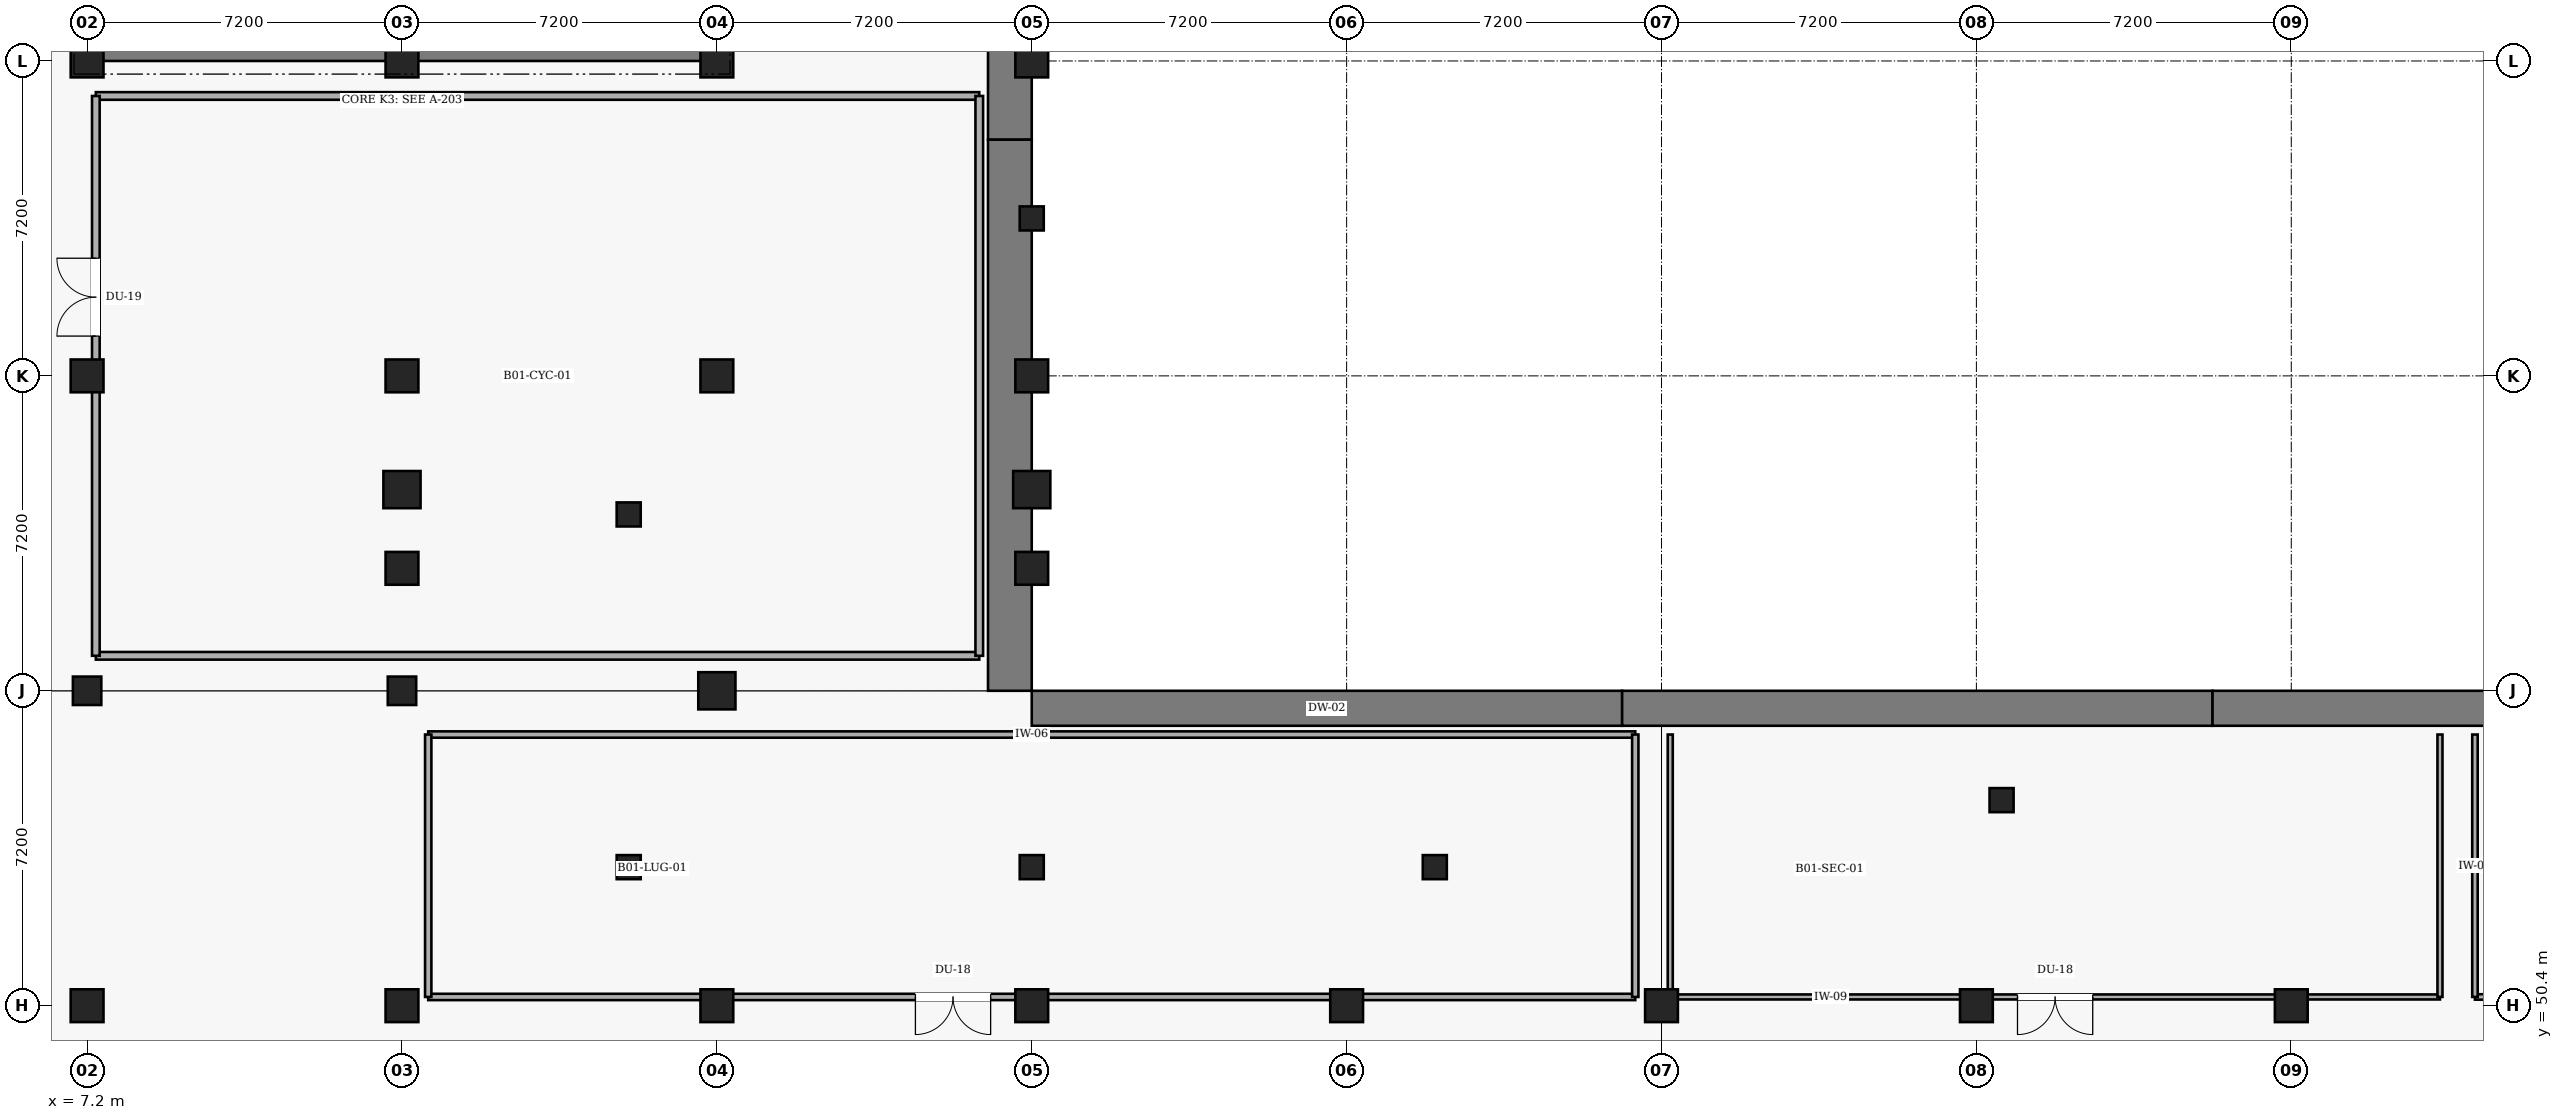
"""IFC4 building model, lengths in metres.
Left out: names, types, materials, properties, quantities, classifications, styles, units other than length and angle.
Written with IfcOpenShell. Run it as: python <this file> out.ifc"""

import sys

from ifc_helpers import new_model, si_unit, direction, frame, frame_2d, origin, origin_2d, place, context, subcontext, project, spatial, rectangle, extrude, element, fill, save


model = new_model("IFC4")
c1 = context("Model", 3, precision=1e-05, world=origin(), true_north=direction((0.0, 1.0)))
c2 = subcontext(c1, "Body", "Model", "MODEL_VIEW")
j1 = project(units=[si_unit("LENGTHUNIT", "METRE"), si_unit("PLANEANGLEUNIT", "RADIAN")], contexts=[c1])
p1 = place(None, origin())
s1 = spatial("IfcSite", under=j1, at=p1, CompositionType="ELEMENT")
p2 = place(p1, origin())
s2 = spatial("IfcBuilding", under=s1, at=p2, CompositionType="ELEMENT")
p3 = place(p2, frame((0.0, 0.0, -5.4)))
s3 = spatial("IfcBuildingStorey", under=s2, at=p3, CompositionType="ELEMENT", Elevation=-5.4)
p4 = place(p3, frame((28.3, 82.8, 0.0), z_axis=(0.0, 0.0, 1.0), x_axis=(0.0, -1.0, 0.0)))
e1 = element("IfcWall", 1, at=p4, inside=s3, PredefinedType="USERDEFINED", context=c2, shape_type="SweptSolid", body=[
    extrude(rectangle(XDim=12.6, YDim=1.0, at=frame_2d((6.3, 0.0))), origin(), (0.0, 0.0, 1.0), 4.95),
])
p5 = place(p3, frame((28.3, 70.2, 0.0), z_axis=(0.0, 0.0, 1.0), x_axis=(0.0, -1.0, 0.0)))
e2 = element("IfcWall", 2, at=p5, inside=s3, PredefinedType="USERDEFINED", context=c2, shape_type="SweptSolid", body=[
    extrude(rectangle(XDim=12.6, YDim=1.0, at=frame_2d((6.3, 0.0))), origin(), (0.0, 0.0, 1.0), 4.95),
])
for number, where, z_axis, x_axis in (
    (3, (28.8, 57.2, 0.0), (0.0, 0.0, 1.0), (1.0, 0.0, 0.0)),
    (4, (42.3, 57.2, 0.0), (0.0, 0.0, 1.0), (1.0, 0.0, 0.0)),
    (5, (55.8, 57.2, 0.0), (0.0, 0.0, 1.0), (1.0, 0.0, 0.0)),
):
    element("IfcWall", number, at=place(p3, frame(where, z_axis=z_axis, x_axis=x_axis)), inside=s3, PredefinedType="USERDEFINED", context=c2, shape_type="SweptSolid", body=[
        extrude(rectangle(XDim=13.5, YDim=0.8, at=frame_2d((6.75, 0.0))), origin(), (0.0, 0.0, 1.0), 4.95),
    ])
p6 = place(p3, frame((21.6, 72.175, 0.0), z_axis=(0.0, 0.0, 1.0), x_axis=(-1.0, 0.0, 0.0)))
e6 = element("IfcWall", 6, at=p6, inside=s3, PredefinedType="SHEAR", context=c2, shape_type="SweptSolid", body=[
    extrude(rectangle(XDim=14.4, YDim=0.35, at=frame_2d((7.2, 0.0))), origin(), (0.0, 0.0, 1.0), 5.4),
])
p7 = place(p3, frame((7.2, 50.4, 0.0), z_axis=(0.0, 0.0, 1.0), x_axis=(1.0, 0.0, 0.0)))
e7 = element("IfcColumn", 7, at=p7, inside=s3, PredefinedType="COLUMN", context=c2, shape_type="SweptSolid", body=[
    extrude(rectangle(XDim=0.75, YDim=0.75, at=origin_2d()), origin(), (0.0, 0.0, 1.0), 4.95),
])
p8 = place(p3, frame((7.2, 57.6, 0.0), z_axis=(0.0, 0.0, 1.0), x_axis=(1.0, 0.0, 0.0)))
e8 = element("IfcColumn", 8, at=p8, inside=s3, PredefinedType="COLUMN", context=c2, shape_type="SweptSolid", body=[
    extrude(rectangle(XDim=0.65, YDim=0.65, at=origin_2d()), origin(), (0.0, 0.0, 1.0), 5.0),
])
for number, where, z_axis, x_axis in (
    (9, (7.2, 64.8, 0.0), (0.0, 0.0, 1.0), (1.0, 0.0, 0.0)),
    (10, (7.2, 72.0, 0.0), (0.0, 0.0, 1.0), (1.0, 0.0, 0.0)),
):
    element("IfcColumn", number, at=place(p3, frame(where, z_axis=z_axis, x_axis=x_axis)), inside=s3, PredefinedType="COLUMN", context=c2, shape_type="SweptSolid", body=[
        extrude(rectangle(XDim=0.75, YDim=0.75, at=origin_2d()), origin(), (0.0, 0.0, 1.0), 5.0),
    ])
p9 = place(p3, frame((14.4, 50.4, 0.0), z_axis=(0.0, 0.0, 1.0), x_axis=(1.0, 0.0, 0.0)))
e11 = element("IfcColumn", 11, at=p9, inside=s3, PredefinedType="COLUMN", context=c2, shape_type="SweptSolid", body=[
    extrude(rectangle(XDim=0.75, YDim=0.75, at=origin_2d()), origin(), (0.0, 0.0, 1.0), 4.95),
])
p10 = place(p3, frame((14.4, 57.6, 0.0), z_axis=(0.0, 0.0, 1.0), x_axis=(1.0, 0.0, 0.0)))
e12 = element("IfcColumn", 12, at=p10, inside=s3, PredefinedType="COLUMN", context=c2, shape_type="SweptSolid", body=[
    extrude(rectangle(XDim=0.65, YDim=0.65, at=origin_2d()), origin(), (0.0, 0.0, 1.0), 5.0),
])
p11 = place(p3, frame((14.4, 60.4, 0.0), z_axis=(0.0, 0.0, 1.0), x_axis=(1.0, 0.0, 0.0)))
e13 = element("IfcColumn", 13, at=p11, inside=s3, PredefinedType="COLUMN", context=c2, shape_type="SweptSolid", body=[
    extrude(rectangle(XDim=0.75, YDim=0.75, at=origin_2d()), origin(), (0.0, 0.0, 1.0), 5.0),
])
p12 = place(p3, frame((14.4, 62.2, 0.0), z_axis=(0.0, 0.0, 1.0), x_axis=(1.0, 0.0, 0.0)))
e14 = element("IfcColumn", 14, at=p12, inside=s3, PredefinedType="COLUMN", context=c2, shape_type="SweptSolid", body=[
    extrude(rectangle(XDim=0.85, YDim=0.85, at=origin_2d()), origin(), (0.0, 0.0, 1.0), 5.0),
])
for number, where, z_axis, x_axis in (
    (15, (14.4, 64.8, 0.0), (0.0, 0.0, 1.0), (1.0, 0.0, 0.0)),
    (16, (14.4, 72.0, 0.0), (0.0, 0.0, 1.0), (1.0, 0.0, 0.0)),
):
    element("IfcColumn", number, at=place(p3, frame(where, z_axis=z_axis, x_axis=x_axis)), inside=s3, PredefinedType="COLUMN", context=c2, shape_type="SweptSolid", body=[
        extrude(rectangle(XDim=0.75, YDim=0.75, at=origin_2d()), origin(), (0.0, 0.0, 1.0), 5.0),
    ])
p13 = place(p3, frame((21.6, 50.4, 0.0), z_axis=(0.0, 0.0, 1.0), x_axis=(1.0, 0.0, 0.0)))
e17 = element("IfcColumn", 17, at=p13, inside=s3, PredefinedType="COLUMN", context=c2, shape_type="SweptSolid", body=[
    extrude(rectangle(XDim=0.75, YDim=0.75, at=origin_2d()), origin(), (0.0, 0.0, 1.0), 4.95),
])
p14 = place(p3, frame((21.6, 57.6, 0.0), z_axis=(0.0, 0.0, 1.0), x_axis=(1.0, 0.0, 0.0)))
e18 = element("IfcColumn", 18, at=p14, inside=s3, PredefinedType="COLUMN", context=c2, shape_type="SweptSolid", body=[
    extrude(rectangle(XDim=0.85, YDim=0.85, at=origin_2d()), origin(), (0.0, 0.0, 1.0), 5.0),
])
for number, where, z_axis, x_axis in (
    (19, (21.6, 64.8, 0.0), (0.0, 0.0, 1.0), (1.0, 0.0, 0.0)),
    (20, (21.6, 72.0, 0.0), (0.0, 0.0, 1.0), (1.0, 0.0, 0.0)),
):
    element("IfcColumn", number, at=place(p3, frame(where, z_axis=z_axis, x_axis=x_axis)), inside=s3, PredefinedType="COLUMN", context=c2, shape_type="SweptSolid", body=[
        extrude(rectangle(XDim=0.75, YDim=0.75, at=origin_2d()), origin(), (0.0, 0.0, 1.0), 5.0),
    ])
p15 = place(p3, frame((28.8, 50.4, 0.0), z_axis=(0.0, 0.0, 1.0), x_axis=(1.0, 0.0, 0.0)))
e21 = element("IfcColumn", 21, at=p15, inside=s3, PredefinedType="COLUMN", context=c2, shape_type="SweptSolid", body=[
    extrude(rectangle(XDim=0.75, YDim=0.75, at=origin_2d()), origin(), (0.0, 0.0, 1.0), 4.95),
])
p16 = place(p3, frame((28.8, 60.4, 0.0), z_axis=(0.0, 0.0, 1.0), x_axis=(1.0, 0.0, 0.0)))
e22 = element("IfcColumn", 22, at=p16, inside=s3, PredefinedType="COLUMN", context=c2, shape_type="SweptSolid", body=[
    extrude(rectangle(XDim=0.75, YDim=0.75, at=origin_2d()), origin(), (0.0, 0.0, 1.0), 5.0),
])
p17 = place(p3, frame((28.8, 62.2, 0.0), z_axis=(0.0, 0.0, 1.0), x_axis=(1.0, 0.0, 0.0)))
e23 = element("IfcColumn", 23, at=p17, inside=s3, PredefinedType="COLUMN", context=c2, shape_type="SweptSolid", body=[
    extrude(rectangle(XDim=0.85, YDim=0.85, at=origin_2d()), origin(), (0.0, 0.0, 1.0), 5.0),
])
for number, where, z_axis, x_axis in (
    (24, (28.8, 64.8, 0.0), (0.0, 0.0, 1.0), (1.0, 0.0, 0.0)),
    (25, (28.8, 72.0, 0.0), (0.0, 0.0, 1.0), (1.0, 0.0, 0.0)),
):
    element("IfcColumn", number, at=place(p3, frame(where, z_axis=z_axis, x_axis=x_axis)), inside=s3, PredefinedType="COLUMN", context=c2, shape_type="SweptSolid", body=[
        extrude(rectangle(XDim=0.75, YDim=0.75, at=origin_2d()), origin(), (0.0, 0.0, 1.0), 5.0),
    ])
for number, where, z_axis, x_axis in (
    (26, (36.0, 50.4, 0.0), (0.0, 0.0, 1.0), (1.0, 0.0, 0.0)),
    (27, (43.2, 50.4, 0.0), (0.0, 0.0, 1.0), (1.0, 0.0, 0.0)),
    (28, (50.4, 50.4, 0.0), (0.0, 0.0, 1.0), (1.0, 0.0, 0.0)),
    (29, (57.6, 50.4, 0.0), (0.0, 0.0, 1.0), (1.0, 0.0, 0.0)),
):
    element("IfcColumn", number, at=place(p3, frame(where, z_axis=z_axis, x_axis=x_axis)), inside=s3, PredefinedType="COLUMN", context=c2, shape_type="SweptSolid", body=[
        extrude(rectangle(XDim=0.75, YDim=0.75, at=origin_2d()), origin(), (0.0, 0.0, 1.0), 4.95),
    ])
for number, where, z_axis, x_axis in (
    (30, (19.584, 53.568, 0.0), (0.0, 0.0, 1.0), (1.0, 0.0, 0.0)),
    (31, (19.584, 61.632, 0.0), (0.0, 0.0, 1.0), (1.0, 0.0, 0.0)),
    (32, (28.8, 53.568, 0.0), (0.0, 0.0, 1.0), (1.0, 0.0, 0.0)),
    (33, (38.016, 53.568, 0.0), (0.0, 0.0, 1.0), (1.0, 0.0, 0.0)),
    (34, (50.976, 55.1, 0.0), (0.0, 0.0, 1.0), (1.0, 0.0, 0.0)),
):
    element("IfcColumn", number, at=place(p3, frame(where, z_axis=z_axis, x_axis=x_axis)), inside=s3, PredefinedType="COLUMN", context=c2, shape_type="SweptSolid", body=[
        extrude(rectangle(XDim=0.55, YDim=0.55, at=origin_2d()), origin(), (0.0, 0.0, 1.0), 4.95),
    ])
p18 = place(p3, frame((28.8, 68.4, 0.0), z_axis=(0.0, 0.0, 1.0), x_axis=(1.0, 0.0, 0.0)))
e35 = element("IfcColumn", 35, at=p18, inside=s3, PredefinedType="COLUMN", context=c2, shape_type="SweptSolid", body=[
    extrude(rectangle(XDim=0.55, YDim=0.55, at=origin_2d()), origin(), (0.0, 0.0, 1.0), 4.85),
])
p19 = place(p3, frame((15.0, 56.6, 0.0), z_axis=(0.0, 0.0, 1.0), x_axis=(1.0, 0.0, 0.0)))
e36 = element("IfcWall", 36, at=p19, inside=s3, PredefinedType="PARTITIONING", context=c2, shape_type="SweptSolid", body=[
    extrude(rectangle(XDim=27.6, YDim=0.145, at=frame_2d((13.8, 0.0))), origin(), (0.0, 0.0, 1.0), 5.05),
])
p20 = place(p3, frame((42.6, 50.6, 0.0), z_axis=(0.0, 0.0, 1.0), x_axis=(-1.0, 0.0, 0.0)))
e37 = element("IfcWall", 37, at=p20, inside=s3, PredefinedType="PARTITIONING", context=c2, shape_type="SweptSolid", body=[
    extrude(rectangle(XDim=27.6, YDim=0.145, at=frame_2d((13.8, 0.0))), origin(), (0.0, 0.0, 1.0), 4.15),
])
p21 = place(p20, frame((14.74, 0.0, 0.0)))
e38 = element("IfcOpeningElement", 38, at=p21, cuts=e37, PredefinedType="OPENING", context=c2, shape_type="SweptSolid", body=[
    extrude(rectangle(XDim=1.72, YDim=2.22, at=frame_2d((0.86, 1.11))), frame((0.0, 0.083, 0.0), z_axis=(0.0, -1.0, 0.0), x_axis=(1.0, 0.0, 0.0)), (0.0, 0.0, 1.0), 0.165),
])
for number, where, z_axis, x_axis in (
    (39, (42.6, 56.6, 0.0), (0.0, 0.0, 1.0), (0.0, -1.0, 0.0)),
    (40, (15.0, 50.6, 0.0), (0.0, 0.0, 1.0), (0.0, 1.0, 0.0)),
):
    element("IfcWall", number, at=place(p3, frame(where, z_axis=z_axis, x_axis=x_axis)), inside=s3, PredefinedType="PARTITIONING", context=c2, shape_type="SweptSolid", body=[
        extrude(rectangle(XDim=6.0, YDim=0.145, at=frame_2d((3.0, 0.0))), origin(), (0.0, 0.0, 1.0), 5.05),
    ])
p22 = place(p3, frame((61.0, 50.6, 0.0), z_axis=(0.0, 0.0, 1.0), x_axis=(-1.0, 0.0, 0.0)))
e41 = element("IfcWall", 41, at=p22, inside=s3, PredefinedType="PARTITIONING", context=c2, shape_type="SweptSolid", body=[
    extrude(rectangle(XDim=17.6, YDim=0.115, at=frame_2d((8.8, 0.0))), origin(), (0.0, 0.0, 1.0), 4.15),
])
p23 = place(p22, frame((7.94, 0.0, 0.0)))
e42 = element("IfcOpeningElement", 42, at=p23, cuts=e41, PredefinedType="OPENING", context=c2, shape_type="SweptSolid", body=[
    extrude(rectangle(XDim=1.72, YDim=2.22, at=frame_2d((0.86, 1.11))), frame((0.0, 0.067, 0.0), z_axis=(0.0, -1.0, 0.0), x_axis=(1.0, 0.0, 0.0)), (0.0, 0.0, 1.0), 0.135),
])
for number, where, z_axis, x_axis in (
    (43, (61.0, 56.6, 0.0), (0.0, 0.0, 1.0), (0.0, -1.0, 0.0)),
    (44, (43.4, 50.6, 0.0), (0.0, 0.0, 1.0), (0.0, 1.0, 0.0)),
):
    element("IfcWall", number, at=place(p3, frame(where, z_axis=z_axis, x_axis=x_axis)), inside=s3, PredefinedType="PARTITIONING", context=c2, shape_type="SweptSolid", body=[
        extrude(rectangle(XDim=6.0, YDim=0.115, at=frame_2d((3.0, 0.0))), origin(), (0.0, 0.0, 1.0), 5.05),
    ])
p24 = place(p3, frame((70.6, 50.6, 0.0), z_axis=(0.0, 0.0, 1.0), x_axis=(-1.0, 0.0, 0.0)))
e45 = element("IfcWall", 45, at=p24, inside=s3, PredefinedType="PARTITIONING", context=c2, shape_type="SweptSolid", body=[
    extrude(rectangle(XDim=8.8, YDim=0.125, at=frame_2d((4.4, 0.0))), origin(), (0.0, 0.0, 1.0), 4.15),
])
p25 = place(p24, frame((2.94, 0.0, 0.0)))
e46 = element("IfcOpeningElement", 46, at=p25, cuts=e45, PredefinedType="OPENING", context=c2, shape_type="SweptSolid", body=[
    extrude(rectangle(XDim=1.72, YDim=2.22, at=frame_2d((0.86, 1.11))), frame((0.0, 0.073, 0.0), z_axis=(0.0, -1.0, 0.0), x_axis=(1.0, 0.0, 0.0)), (0.0, 0.0, 1.0), 0.145),
])
p26 = place(p3, frame((61.8, 50.6, 0.0), z_axis=(0.0, 0.0, 1.0), x_axis=(0.0, 1.0, 0.0)))
e47 = element("IfcWall", 47, at=p26, inside=s3, PredefinedType="PARTITIONING", context=c2, shape_type="SweptSolid", body=[
    extrude(rectangle(XDim=6.0, YDim=0.125, at=frame_2d((3.0, 0.0))), origin(), (0.0, 0.0, 1.0), 5.05),
])
p27 = place(p3, frame((7.4, 71.2, 0.0), z_axis=(0.0, 0.0, 1.0), x_axis=(1.0, 0.0, 0.0)))
e48 = element("IfcWall", 48, at=p27, inside=s3, PredefinedType="PARTITIONING", context=c2, shape_type="SweptSolid", body=[
    extrude(rectangle(XDim=20.2, YDim=0.175, at=frame_2d((10.1, 0.0))), origin(), (0.0, 0.0, 1.0), 4.2),
])
p28 = place(p3, frame((27.6, 58.4, 0.0), z_axis=(0.0, 0.0, 1.0), x_axis=(-1.0, 0.0, 0.0)))
e49 = element("IfcWall", 49, at=p28, inside=s3, PredefinedType="PARTITIONING", context=c2, shape_type="SweptSolid", body=[
    extrude(rectangle(XDim=20.2, YDim=0.175, at=frame_2d((10.1, 0.0))), origin(), (0.0, 0.0, 1.0), 4.45),
])
p29 = place(p3, frame((27.6, 71.2, 0.0), z_axis=(0.0, 0.0, 1.0), x_axis=(0.0, -1.0, 0.0)))
e50 = element("IfcWall", 50, at=p29, inside=s3, PredefinedType="PARTITIONING", context=c2, shape_type="SweptSolid", body=[
    extrude(rectangle(XDim=12.8, YDim=0.175, at=frame_2d((6.4, 0.0))), origin(), (0.0, 0.0, 1.0), 4.45),
])
p30 = place(p3, frame((7.4, 58.4, 0.0), z_axis=(0.0, 0.0, 1.0), x_axis=(0.0, 1.0, 0.0)))
e51 = element("IfcWall", 51, at=p30, inside=s3, PredefinedType="PARTITIONING", context=c2, shape_type="SweptSolid", body=[
    extrude(rectangle(XDim=12.8, YDim=0.175, at=frame_2d((6.4, 0.0))), origin(), (0.0, 0.0, 1.0), 4.2),
])
p31 = place(p30, frame((7.31, 0.0, 0.0)))
e52 = element("IfcOpeningElement", 52, at=p31, cuts=e51, PredefinedType="OPENING", context=c2, shape_type="SweptSolid", body=[
    extrude(rectangle(XDim=1.78, YDim=2.28, at=frame_2d((0.89, 1.14))), frame((0.0, 0.097, 0.0), z_axis=(0.0, -1.0, 0.0), x_axis=(1.0, 0.0, 0.0)), (0.0, 0.0, 1.0), 0.195),
])
p32 = place(p21, origin())
e53 = element("IfcDoor", 53, at=p32, inside=s3, OperationType="DOUBLE_DOOR_SINGLE_SWING", PredefinedType="DOOR", context=c2, shape_type="SweptSolid", body=[
    extrude(rectangle(XDim=1.72, YDim=2.22, at=frame_2d((0.86, 1.11))), frame((0.0, 0.025, 0.0), z_axis=(0.0, -1.0, 0.0), x_axis=(1.0, 0.0, 0.0)), (0.0, 0.0, 1.0), 0.05),
])
fill(e38, e53)
p33 = place(p23, origin())
e54 = element("IfcDoor", 54, at=p33, inside=s3, OperationType="DOUBLE_DOOR_SINGLE_SWING", PredefinedType="DOOR", context=c2, shape_type="SweptSolid", body=[
    extrude(rectangle(XDim=1.72, YDim=2.22, at=frame_2d((0.86, 1.11))), frame((0.0, 0.025, 0.0), z_axis=(0.0, -1.0, 0.0), x_axis=(1.0, 0.0, 0.0)), (0.0, 0.0, 1.0), 0.05),
])
fill(e42, e54)
p34 = place(p31, origin())
e55 = element("IfcDoor", 55, at=p34, inside=s3, OperationType="DOUBLE_DOOR_SINGLE_SWING", PredefinedType="DOOR", context=c2, shape_type="SweptSolid", body=[
    extrude(rectangle(XDim=1.78, YDim=2.28, at=frame_2d((0.89, 1.14))), frame((0.0, 0.025, 0.0), z_axis=(0.0, -1.0, 0.0), x_axis=(1.0, 0.0, 0.0)), (0.0, 0.0, 1.0), 0.05),
])
fill(e52, e55)
save(model, sys.argv[1])
